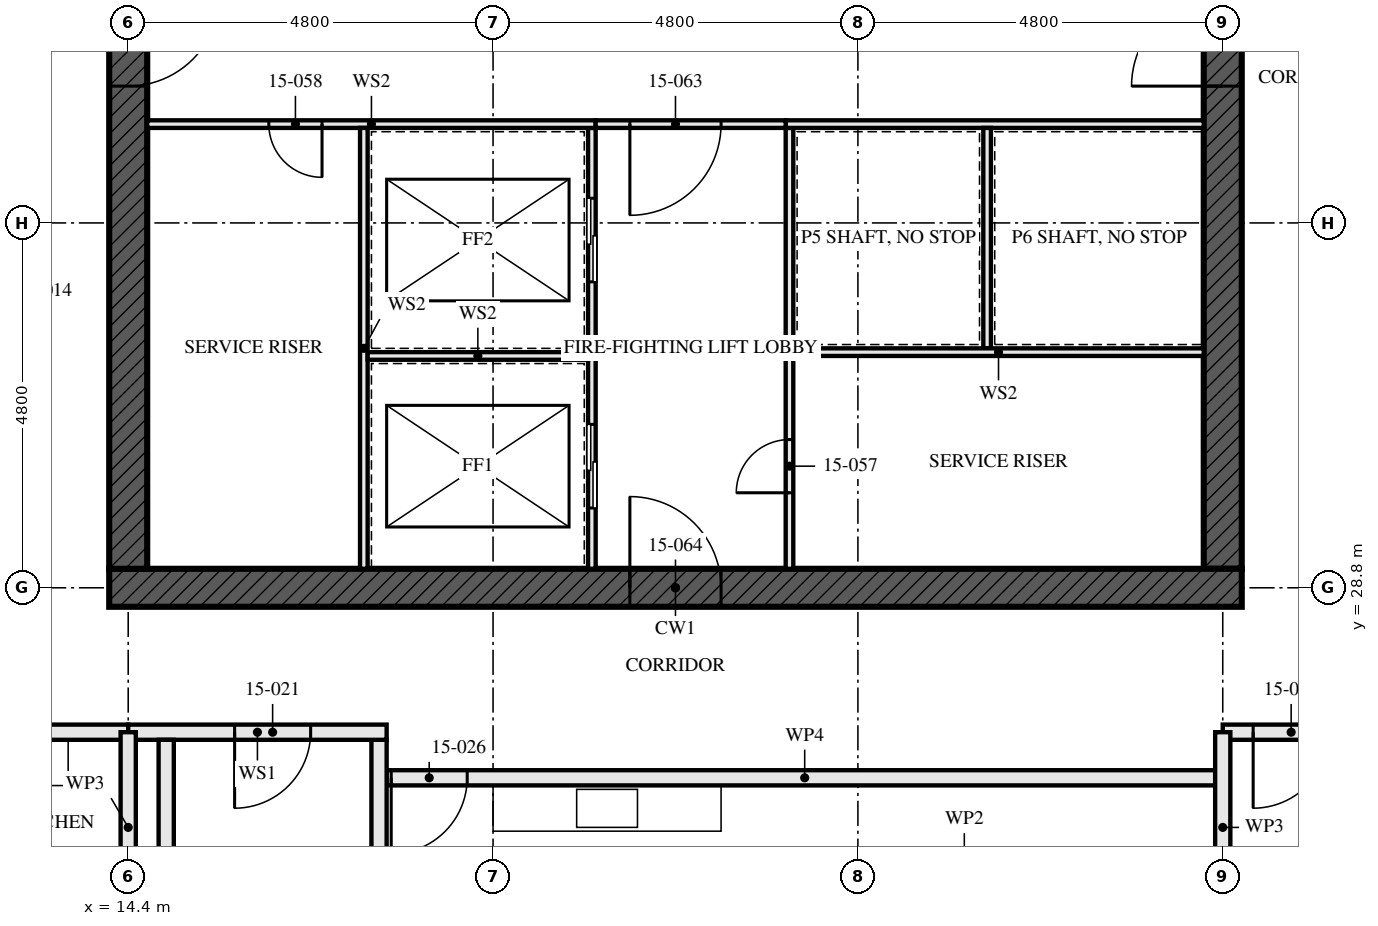
"""IFC4 building model, lengths in metres.
Left out: names, types, materials, properties, quantities, classifications, styles, units other than length and angle.
Written with IfcOpenShell. Run it as: python <this file> out.ifc"""

import sys

from ifc_helpers import new_model, si_unit, direction, frame, frame_2d, origin, place, context, subcontext, project, spatial, rectangle, extrude, element, fill, save


model = new_model("IFC4")
c1 = context("Model", 3, precision=1e-05, world=origin(), true_north=direction((0.0, 1.0)))
c2 = subcontext(c1, "Body", "Model", "MODEL_VIEW")
j1 = project(units=[si_unit("LENGTHUNIT", "METRE"), si_unit("PLANEANGLEUNIT", "RADIAN")], contexts=[c1])
p1 = place(None, origin())
s1 = spatial("IfcSite", under=j1, at=p1, CompositionType="ELEMENT")
p2 = place(p1, origin())
s2 = spatial("IfcBuilding", under=s1, at=p2, CompositionType="ELEMENT")
p3 = place(p2, frame((0.0, 0.0, 58.5)))
s3 = spatial("IfcBuildingStorey", under=s2, at=p3, CompositionType="ELEMENT", Elevation=58.5)
p4 = place(p3, frame((14.15, 28.8, -0.17), z_axis=(0.0, 0.0, 1.0), x_axis=(1.0, 0.0, 0.0)))
e1 = element("IfcWall", 1, at=p4, inside=s3, PredefinedType="SHEAR", context=c2, shape_type="SweptSolid", body=[
    extrude(rectangle(XDim=14.9, YDim=0.5, at=frame_2d((7.45, 0.0))), origin(), (0.0, 0.0, 1.0), 3.5),
])
p5 = place(p4, frame((6.85, 0.0, 0.17)))
e2 = element("IfcOpeningElement", 2, at=p5, cuts=e1, PredefinedType="OPENING", context=c2, shape_type="SweptSolid", body=[
    extrude(rectangle(XDim=1.2, YDim=2.1, at=frame_2d((0.6, 1.05))), frame((0.0, 0.26, 0.0), z_axis=(0.0, -1.0, 0.0), x_axis=(1.0, 0.0, 0.0)), (0.0, 0.0, 1.0), 0.521),
])
p6 = place(p3, frame((14.4, 42.95, -0.17), z_axis=(0.0, 0.0, 1.0), x_axis=(0.0, -1.0, 0.0)))
e3 = element("IfcWall", 3, at=p6, inside=s3, PredefinedType="SHEAR", context=c2, shape_type="SweptSolid", body=[
    extrude(rectangle(XDim=13.9, YDim=0.5, at=frame_2d((6.95, 0.0))), origin(), (0.0, 0.0, 1.0), 3.5),
])
p7 = place(p6, frame((6.35, 0.0, 0.17)))
e4 = element("IfcOpeningElement", 4, at=p7, cuts=e3, PredefinedType="OPENING", context=c2, shape_type="SweptSolid", body=[
    extrude(rectangle(XDim=1.2, YDim=2.1, at=frame_2d((0.6, 1.05))), frame((0.0, 0.26, 0.0), z_axis=(0.0, -1.0, 0.0), x_axis=(1.0, 0.0, 0.0)), (0.0, 0.0, 1.0), 0.521),
])
p8 = place(p3, frame((28.8, 29.05, -0.17), z_axis=(0.0, 0.0, 1.0), x_axis=(0.0, 1.0, 0.0)))
e5 = element("IfcWall", 5, at=p8, inside=s3, PredefinedType="SHEAR", context=c2, shape_type="SweptSolid", body=[
    extrude(rectangle(XDim=13.9, YDim=0.5, at=frame_2d((6.95, 0.0))), origin(), (0.0, 0.0, 1.0), 3.5),
])
p9 = place(p8, frame((6.35, 0.0, 0.17)))
e6 = element("IfcOpeningElement", 6, at=p9, cuts=e5, PredefinedType="OPENING", context=c2, shape_type="SweptSolid", body=[
    extrude(rectangle(XDim=1.2, YDim=2.1, at=frame_2d((0.6, 1.05))), frame((0.0, 0.26, 0.0), z_axis=(0.0, -1.0, 0.0), x_axis=(1.0, 0.0, 0.0)), (0.0, 0.0, 1.0), 0.521),
])
p10 = place(p3, frame((4.8, 26.9, 0.0), z_axis=(0.0, 0.0, 1.0), x_axis=(1.0, 0.0, 0.0)))
e7 = element("IfcWall", 7, at=p10, inside=s3, PredefinedType="PARTITIONING", context=c2, shape_type="SweptSolid", body=[
    extrude(rectangle(XDim=9.6, YDim=0.2, at=frame_2d((4.8, 0.0))), origin(), (0.0, 0.0, 1.0), 3.33),
])
p11 = place(p10, frame((0.4, 0.0, 0.0)))
e8 = element("IfcOpeningElement", 8, at=p11, cuts=e7, PredefinedType="OPENING", context=c2, shape_type="SweptSolid", body=[
    extrude(rectangle(XDim=1.0, YDim=2.1, at=frame_2d((0.5, 1.05))), frame((0.0, 0.111, 0.0), z_axis=(0.0, -1.0, 0.0), x_axis=(1.0, 0.0, 0.0)), (0.0, 0.0, 1.0), 0.221),
])
for number, where, z_axis, x_axis in (
    (9, (14.9, 22.1, 0.0), (0.0, 0.0, 1.0), (0.0, 1.0, 0.0)),
    (10, (17.7, 22.1, 0.0), (0.0, 0.0, 1.0), (0.0, 1.0, 0.0)),
):
    element("IfcWall", number, at=place(p3, frame(where, z_axis=z_axis, x_axis=x_axis)), inside=s3, PredefinedType="SOLIDWALL", context=c2, shape_type="SweptSolid", body=[
        extrude(rectangle(XDim=4.7, YDim=0.2, at=frame_2d((2.35, 0.0))), origin(), (0.0, 0.0, 1.0), 2.99),
    ])
p12 = place(p3, frame((14.4, 26.9, 0.0), z_axis=(0.0, 0.0, 1.0), x_axis=(1.0, 0.0, 0.0)))
e11 = element("IfcWall", 11, at=p12, inside=s3, PredefinedType="SOLIDWALL", context=c2, shape_type="SweptSolid", body=[
    extrude(rectangle(XDim=3.4, YDim=0.2, at=frame_2d((1.7, 0.0))), origin(), (0.0, 0.0, 1.0), 3.33),
])
p13 = place(p12, frame((1.4, 0.0, 0.0)))
e12 = element("IfcOpeningElement", 12, at=p13, cuts=e11, PredefinedType="OPENING", context=c2, shape_type="SweptSolid", body=[
    extrude(rectangle(XDim=1.0, YDim=2.1, at=frame_2d((0.5, 1.05))), frame((0.0, 0.111, 0.0), z_axis=(0.0, -1.0, 0.0), x_axis=(1.0, 0.0, 0.0)), (0.0, 0.0, 1.0), 0.221),
])
p14 = place(p3, frame((17.8, 26.3, 0.0), z_axis=(0.0, 0.0, 1.0), x_axis=(1.0, 0.0, 0.0)))
e13 = element("IfcWall", 13, at=p14, inside=s3, PredefinedType="PARTITIONING", context=c2, shape_type="SweptSolid", body=[
    extrude(rectangle(XDim=11.0, YDim=0.2, at=frame_2d((5.5, 0.0))), origin(), (0.0, 0.0, 1.0), 2.55),
])
p15 = place(p14, frame((0.06, 0.0, 0.0)))
e14 = element("IfcOpeningElement", 14, at=p15, cuts=e13, PredefinedType="OPENING", context=c2, shape_type="SweptSolid", body=[
    extrude(rectangle(XDim=1.0, YDim=2.1, at=frame_2d((0.5, 1.05))), frame((0.0, 0.111, 0.0), z_axis=(0.0, -1.0, 0.0), x_axis=(1.0, 0.0, 0.0)), (0.0, 0.0, 1.0), 0.221),
])
p16 = place(p3, frame((28.8, 26.9, 0.0), z_axis=(0.0, 0.0, 1.0), x_axis=(1.0, 0.0, 0.0)))
e15 = element("IfcWall", 15, at=p16, inside=s3, PredefinedType="PARTITIONING", context=c2, shape_type="SweptSolid", body=[
    extrude(rectangle(XDim=9.6, YDim=0.2, at=frame_2d((4.8, 0.0))), origin(), (0.0, 0.0, 1.0), 3.33),
])
p17 = place(p16, frame((0.4, 0.0, 0.0)))
e16 = element("IfcOpeningElement", 16, at=p17, cuts=e15, PredefinedType="OPENING", context=c2, shape_type="SweptSolid", body=[
    extrude(rectangle(XDim=1.0, YDim=2.1, at=frame_2d((0.5, 1.05))), frame((0.0, 0.111, 0.0), z_axis=(0.0, -1.0, 0.0), x_axis=(1.0, 0.0, 0.0)), (0.0, 0.0, 1.0), 0.221),
])
p18 = place(p3, frame((20.5, 29.05, 0.0), z_axis=(0.0, 0.0, 1.0), x_axis=(0.0, 1.0, 0.0)))
e17 = element("IfcWall", 17, at=p18, inside=s3, PredefinedType="SOLIDWALL", context=c2, shape_type="SweptSolid", body=[
    extrude(rectangle(XDim=5.8, YDim=0.1, at=frame_2d((2.9, 0.0))), origin(), (0.0, 0.0, 1.0), 3.33),
])
p19 = place(p18, frame((0.8, 0.0, 0.0)))
e18 = element("IfcOpeningElement", 18, at=p19, cuts=e17, PredefinedType="OPENING", context=c2, shape_type="SweptSolid", body=[
    extrude(rectangle(XDim=1.1, YDim=2.3, at=frame_2d((0.55, 1.15))), frame((0.0, 0.061, 0.0), z_axis=(0.0, -1.0, 0.0), x_axis=(1.0, 0.0, 0.0)), (0.0, 0.0, 1.0), 0.121),
])
p20 = place(p18, frame((3.775, 0.0, 0.0)))
e19 = element("IfcOpeningElement", 19, at=p20, cuts=e17, PredefinedType="OPENING", context=c2, shape_type="SweptSolid", body=[
    extrude(rectangle(XDim=1.1, YDim=2.3, at=frame_2d((0.55, 1.15))), frame((0.0, 0.061, 0.0), z_axis=(0.0, -1.0, 0.0), x_axis=(1.0, 0.0, 0.0)), (0.0, 0.0, 1.0), 0.121),
])
p21 = place(p3, frame((23.1, 29.05, 0.0), z_axis=(0.0, 0.0, 1.0), x_axis=(0.0, 1.0, 0.0)))
e20 = element("IfcWall", 20, at=p21, inside=s3, PredefinedType="SOLIDWALL", context=c2, shape_type="SweptSolid", body=[
    extrude(rectangle(XDim=5.8, YDim=0.1, at=frame_2d((2.9, 0.0))), origin(), (0.0, 0.0, 1.0), 3.33),
])
p22 = place(p21, frame((1.0, 0.0, 0.0)))
e21 = element("IfcOpeningElement", 21, at=p22, cuts=e20, PredefinedType="OPENING", context=c2, shape_type="SweptSolid", body=[
    extrude(rectangle(XDim=0.7, YDim=2.1, at=frame_2d((0.35, 1.05))), frame((0.0, 0.061, 0.0), z_axis=(0.0, -1.0, 0.0), x_axis=(1.0, 0.0, 0.0)), (0.0, 0.0, 1.0), 0.121),
])
p23 = place(p3, frame((14.65, 34.9, 0.0), z_axis=(0.0, 0.0, 1.0), x_axis=(1.0, 0.0, 0.0)))
e22 = element("IfcWall", 22, at=p23, inside=s3, PredefinedType="SOLIDWALL", context=c2, shape_type="SweptSolid", body=[
    extrude(rectangle(XDim=5.9, YDim=0.1, at=frame_2d((2.95, 0.0))), origin(), (0.0, 0.0, 1.0), 3.33),
])
p24 = place(p23, frame((1.6, 0.0, 0.0)))
e23 = element("IfcOpeningElement", 23, at=p24, cuts=e22, PredefinedType="OPENING", context=c2, shape_type="SweptSolid", body=[
    extrude(rectangle(XDim=0.7, YDim=2.1, at=frame_2d((0.35, 1.05))), frame((0.0, 0.061, 0.0), z_axis=(0.0, -1.0, 0.0), x_axis=(1.0, 0.0, 0.0)), (0.0, 0.0, 1.0), 0.121),
])
p25 = place(p3, frame((23.05, 34.9, 0.0), z_axis=(0.0, 0.0, 1.0), x_axis=(1.0, 0.0, 0.0)))
e24 = element("IfcWall", 24, at=p25, inside=s3, PredefinedType="SOLIDWALL", context=c2, shape_type="SweptSolid", body=[
    extrude(rectangle(XDim=5.5, YDim=0.1, at=frame_2d((2.75, 0.0))), origin(), (0.0, 0.0, 1.0), 3.33),
])
p26 = place(p3, frame((20.55, 34.9, 0.0), z_axis=(0.0, 0.0, 1.0), x_axis=(1.0, 0.0, 0.0)))
e25 = element("IfcWall", 25, at=p26, inside=s3, PredefinedType="SOLIDWALL", context=c2, shape_type="SweptSolid", body=[
    extrude(rectangle(XDim=2.5, YDim=0.1, at=frame_2d((1.25, 0.0))), origin(), (0.0, 0.0, 1.0), 3.33),
])
p27 = place(p26, frame((0.45, 0.0, 0.0)))
e26 = element("IfcOpeningElement", 26, at=p27, cuts=e25, PredefinedType="OPENING", context=c2, shape_type="SweptSolid", body=[
    extrude(rectangle(XDim=1.2, YDim=2.1, at=frame_2d((0.6, 1.05))), frame((0.0, 0.061, 0.0), z_axis=(0.0, -1.0, 0.0), x_axis=(1.0, 0.0, 0.0)), (0.0, 0.0, 1.0), 0.121),
])
p28 = place(p3, frame((17.5, 29.05, 0.0), z_axis=(0.0, 0.0, 1.0), x_axis=(0.0, 1.0, 0.0)))
e27 = element("IfcWall", 27, at=p28, inside=s3, PredefinedType="SOLIDWALL", context=c2, shape_type="SweptSolid", body=[
    extrude(rectangle(XDim=5.8, YDim=0.1, at=frame_2d((2.9, 0.0))), origin(), (0.0, 0.0, 1.0), 3.33),
])
p29 = place(p3, frame((17.55, 31.85, 0.0), z_axis=(0.0, 0.0, 1.0), x_axis=(1.0, 0.0, 0.0)))
e28 = element("IfcWall", 28, at=p29, inside=s3, PredefinedType="SOLIDWALL", context=c2, shape_type="SweptSolid", body=[
    extrude(rectangle(XDim=2.9, YDim=0.1, at=frame_2d((1.45, 0.0))), origin(), (0.0, 0.0, 1.0), 3.33),
])
p30 = place(p3, frame((25.7, 31.95, 0.0), z_axis=(0.0, 0.0, 1.0), x_axis=(0.0, 1.0, 0.0)))
e29 = element("IfcWall", 29, at=p30, inside=s3, PredefinedType="SOLIDWALL", context=c2, shape_type="SweptSolid", body=[
    extrude(rectangle(XDim=2.9, YDim=0.1, at=frame_2d((1.45, 0.0))), origin(), (0.0, 0.0, 1.0), 3.33),
])
p31 = place(p3, frame((23.15, 31.9, 0.0), z_axis=(0.0, 0.0, 1.0), x_axis=(1.0, 0.0, 0.0)))
e30 = element("IfcWall", 30, at=p31, inside=s3, PredefinedType="SOLIDWALL", context=c2, shape_type="SweptSolid", body=[
    extrude(rectangle(XDim=5.4, YDim=0.1, at=frame_2d((2.7, 0.0))), origin(), (0.0, 0.0, 1.0), 3.33),
])
for number, where, z_axis, x_axis in (
    (31, (14.4, 24.395, 0.0), (0.0, 0.0, 1.0), (0.0, 1.0, 0.0)),
    (32, (28.8, 24.395, 0.0), (0.0, 0.0, 1.0), (0.0, 1.0, 0.0)),
):
    element("IfcWall", number, at=place(p3, frame(where, z_axis=z_axis, x_axis=x_axis)), inside=s3, PredefinedType="PARTITIONING", context=c2, shape_type="SweptSolid", body=[
        extrude(rectangle(XDim=2.505, YDim=0.2, at=frame_2d((1.252, 0.0))), origin(), (0.0, 0.0, 1.0), 2.32),
    ])
p32 = place(p13, frame((1.0, 0.0, 0.0), z_axis=(0.0, 0.0, 1.0), x_axis=(-1.0, 0.0, 0.0)))
e33 = element("IfcDoor", 33, at=p32, inside=s3, OperationType="SINGLE_SWING_LEFT", PredefinedType="DOOR", context=c2, shape_type="SweptSolid", body=[
    extrude(rectangle(XDim=1.0, YDim=2.1, at=frame_2d((0.5, 1.05))), frame((0.0, 0.032, 0.0), z_axis=(0.0, -1.0, 0.0), x_axis=(1.0, 0.0, 0.0)), (0.0, 0.0, 1.0), 0.064),
])
fill(e12, e33)
p33 = place(p15, frame((1.0, 0.0, 0.0), z_axis=(0.0, 0.0, 1.0), x_axis=(-1.0, 0.0, 0.0)))
e34 = element("IfcDoor", 34, at=p33, inside=s3, OperationType="SINGLE_SWING_LEFT", PredefinedType="DOOR", context=c2, shape_type="SweptSolid", body=[
    extrude(rectangle(XDim=1.0, YDim=2.1, at=frame_2d((0.5, 1.05))), frame((0.0, 0.027, 0.0), z_axis=(0.0, -1.0, 0.0), x_axis=(1.0, 0.0, 0.0)), (0.0, 0.0, 1.0), 0.054),
])
fill(e14, e34)
p34 = place(p17, frame((1.0, 0.0, 0.0), z_axis=(0.0, 0.0, 1.0), x_axis=(-1.0, 0.0, 0.0)))
e35 = element("IfcDoor", 35, at=p34, inside=s3, OperationType="SINGLE_SWING_LEFT", PredefinedType="DOOR", context=c2, shape_type="SweptSolid", body=[
    extrude(rectangle(XDim=1.0, YDim=2.1, at=frame_2d((0.5, 1.05))), frame((0.0, 0.027, 0.0), z_axis=(0.0, -1.0, 0.0), x_axis=(1.0, 0.0, 0.0)), (0.0, 0.0, 1.0), 0.054),
])
fill(e16, e35)
p35 = place(p19, origin())
e36 = element("IfcDoor", 36, at=p35, inside=s3, OperationType="SLIDING_TO_LEFT", PredefinedType="DOOR", context=c2, shape_type="SweptSolid", body=[
    extrude(rectangle(XDim=1.1, YDim=2.3, at=frame_2d((0.55, 1.15))), frame((0.0, 0.05, 0.0), z_axis=(0.0, -1.0, 0.0), x_axis=(1.0, 0.0, 0.0)), (0.0, 0.0, 1.0), 0.1),
])
fill(e18, e36)
p36 = place(p20, origin())
e37 = element("IfcDoor", 37, at=p36, inside=s3, OperationType="SLIDING_TO_LEFT", PredefinedType="DOOR", context=c2, shape_type="SweptSolid", body=[
    extrude(rectangle(XDim=1.1, YDim=2.3, at=frame_2d((0.55, 1.15))), frame((0.0, 0.05, 0.0), z_axis=(0.0, -1.0, 0.0), x_axis=(1.0, 0.0, 0.0)), (0.0, 0.0, 1.0), 0.1),
])
fill(e19, e37)
p37 = place(p22, origin())
e38 = element("IfcDoor", 38, at=p37, inside=s3, OperationType="SINGLE_SWING_RIGHT", PredefinedType="DOOR", context=c2, shape_type="SweptSolid", body=[
    extrude(rectangle(XDim=0.7, YDim=2.1, at=frame_2d((0.35, 1.05))), frame((0.0, 0.027, 0.0), z_axis=(0.0, -1.0, 0.0), x_axis=(1.0, 0.0, 0.0)), (0.0, 0.0, 1.0), 0.054),
])
fill(e21, e38)
p38 = place(p24, frame((0.7, 0.0, 0.0), z_axis=(0.0, 0.0, 1.0), x_axis=(-1.0, 0.0, 0.0)))
e39 = element("IfcDoor", 39, at=p38, inside=s3, OperationType="SINGLE_SWING_RIGHT", PredefinedType="DOOR", context=c2, shape_type="SweptSolid", body=[
    extrude(rectangle(XDim=0.7, YDim=2.1, at=frame_2d((0.35, 1.05))), frame((0.0, 0.027, 0.0), z_axis=(0.0, -1.0, 0.0), x_axis=(1.0, 0.0, 0.0)), (0.0, 0.0, 1.0), 0.054),
])
fill(e23, e39)
p39 = place(p27, frame((1.2, 0.0, 0.0), z_axis=(0.0, 0.0, 1.0), x_axis=(-1.0, 0.0, 0.0)))
e40 = element("IfcDoor", 40, at=p39, inside=s3, OperationType="SINGLE_SWING_LEFT", PredefinedType="DOOR", context=c2, shape_type="SweptSolid", body=[
    extrude(rectangle(XDim=1.2, YDim=2.1, at=frame_2d((0.6, 1.05))), frame((0.0, 0.027, 0.0), z_axis=(0.0, -1.0, 0.0), x_axis=(1.0, 0.0, 0.0)), (0.0, 0.0, 1.0), 0.054),
])
fill(e26, e40)
p40 = place(p5, origin())
e41 = element("IfcDoor", 41, at=p40, inside=s3, OperationType="SINGLE_SWING_LEFT", PredefinedType="DOOR", context=c2, shape_type="SweptSolid", body=[
    extrude(rectangle(XDim=1.2, YDim=2.1, at=frame_2d((0.6, 1.05))), frame((0.0, 0.027, 0.0), z_axis=(0.0, -1.0, 0.0), x_axis=(1.0, 0.0, 0.0)), (0.0, 0.0, 1.0), 0.054),
])
fill(e2, e41)
p41 = place(p7, origin())
e42 = element("IfcDoor", 42, at=p41, inside=s3, OperationType="SINGLE_SWING_LEFT", PredefinedType="DOOR", context=c2, shape_type="SweptSolid", body=[
    extrude(rectangle(XDim=1.2, YDim=2.1, at=frame_2d((0.6, 1.05))), frame((0.0, 0.027, 0.0), z_axis=(0.0, -1.0, 0.0), x_axis=(1.0, 0.0, 0.0)), (0.0, 0.0, 1.0), 0.054),
])
fill(e4, e42)
p42 = place(p9, origin())
e43 = element("IfcDoor", 43, at=p42, inside=s3, OperationType="SINGLE_SWING_LEFT", PredefinedType="DOOR", context=c2, shape_type="SweptSolid", body=[
    extrude(rectangle(XDim=1.2, YDim=2.1, at=frame_2d((0.6, 1.05))), frame((0.0, 0.027, 0.0), z_axis=(0.0, -1.0, 0.0), x_axis=(1.0, 0.0, 0.0)), (0.0, 0.0, 1.0), 0.054),
])
fill(e6, e43)
save(model, sys.argv[1])
